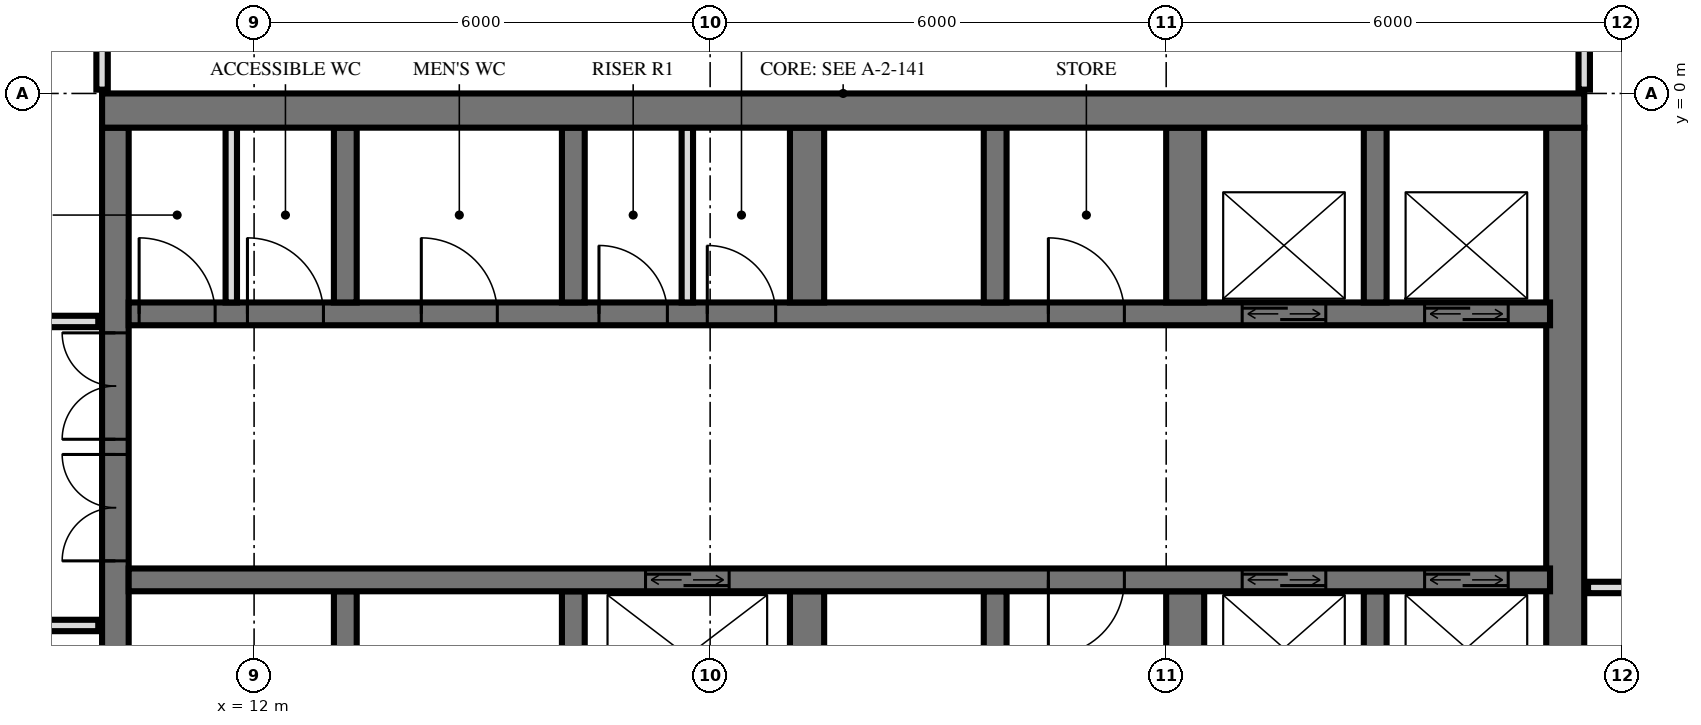
"""IFC4 building model, lengths in metres.
Left out: names, types, materials, properties, quantities, classifications, styles, units other than length and angle.
Written with IfcOpenShell. Run it as: python <this file> out.ifc"""

import sys

from ifc_helpers import new_model, si_unit, direction, frame, frame_2d, origin, place, context, subcontext, project, spatial, rectangle, extrude, element, fill, save


model = new_model("IFC4")
c1 = context("Model", 3, precision=1e-05, world=origin(), true_north=direction((0.0, 1.0)))
c2 = subcontext(c1, "Body", "Model", "MODEL_VIEW")
j1 = project(units=[si_unit("LENGTHUNIT", "METRE"), si_unit("PLANEANGLEUNIT", "RADIAN")], contexts=[c1])
p1 = place(None, origin())
s1 = spatial("IfcSite", under=j1, at=p1, CompositionType="ELEMENT")
p2 = place(p1, origin())
s2 = spatial("IfcBuilding", under=s1, at=p2, CompositionType="ELEMENT")
p3 = place(p2, frame((0.0, 0.0, 67.2)))
s3 = spatial("IfcBuildingStorey", under=s2, at=p3, CompositionType="ELEMENT", Elevation=67.2)
p4 = place(p3, frame((10.0, -0.225, 0.0), z_axis=(0.0, 0.0, 1.0), x_axis=(1.0, 0.0, 0.0)))
e1 = element("IfcWall", 1, at=p4, inside=s3, PredefinedType="SHEAR", context=c2, shape_type="SweptSolid", body=[
    extrude(rectangle(XDim=19.5, YDim=0.45, at=frame_2d((9.75, 0.0))), origin(), (0.0, 0.0, 1.0), 3.6),
])
p5 = place(p3, frame((10.175, -14.55, 0.0), z_axis=(0.0, 0.0, 1.0), x_axis=(0.0, 1.0, 0.0)))
e2 = element("IfcWall", 2, at=p5, inside=s3, PredefinedType="SHEAR", context=c2, shape_type="SweptSolid", body=[
    extrude(rectangle(XDim=14.1, YDim=0.35, at=frame_2d((7.05, 0.0))), origin(), (0.0, 0.0, 1.0), 3.6),
])
p6 = place(p5, frame((8.4, 0.0, 0.0)))
e3 = element("IfcOpeningElement", 3, at=p6, cuts=e2, PredefinedType="OPENING", context=c2, shape_type="SweptSolid", body=[
    extrude(rectangle(XDim=1.4, YDim=2.4, at=frame_2d((0.7, 1.2))), frame((0.0, 0.185, 0.0), z_axis=(0.0, -1.0, 0.0), x_axis=(1.0, 0.0, 0.0)), (0.0, 0.0, 1.0), 0.37),
])
p7 = place(p5, frame((10.0, 0.0, 0.0)))
e4 = element("IfcOpeningElement", 4, at=p7, cuts=e2, PredefinedType="OPENING", context=c2, shape_type="SweptSolid", body=[
    extrude(rectangle(XDim=1.4, YDim=2.4, at=frame_2d((0.7, 1.2))), frame((0.0, 0.185, 0.0), z_axis=(0.0, -1.0, 0.0), x_axis=(1.0, 0.0, 0.0)), (0.0, 0.0, 1.0), 0.37),
])
p8 = place(p5, frame((4.0, 0.0, 0.0)))
e5 = element("IfcOpeningElement", 5, at=p8, cuts=e2, PredefinedType="OPENING", context=c2, shape_type="SweptSolid", body=[
    extrude(rectangle(XDim=1.2, YDim=2.1, at=frame_2d((0.6, 1.05))), frame((0.0, 0.185, 0.0), z_axis=(0.0, -1.0, 0.0), x_axis=(1.0, 0.0, 0.0)), (0.0, 0.0, 1.0), 0.37),
])
p9 = place(p3, frame((29.25, -14.55, 0.0), z_axis=(0.0, 0.0, 1.0), x_axis=(0.0, 1.0, 0.0)))
e6 = element("IfcWall", 6, at=p9, inside=s3, PredefinedType="SHEAR", context=c2, shape_type="SweptSolid", body=[
    extrude(rectangle(XDim=14.1, YDim=0.5, at=frame_2d((7.05, 0.0))), origin(), (0.0, 0.0, 1.0), 3.6),
])
p10 = place(p3, frame((10.35, -2.9, 0.0), z_axis=(0.0, 0.0, 1.0), x_axis=(1.0, 0.0, 0.0)))
e7 = element("IfcWall", 7, at=p10, inside=s3, PredefinedType="SHEAR", context=c2, shape_type="SweptSolid", body=[
    extrude(rectangle(XDim=18.7, YDim=0.3, at=frame_2d((9.35, 0.0))), origin(), (0.0, 0.0, 1.0), 3.6),
])
p11 = place(p10, frame((14.65, 0.0, 0.0)))
e8 = element("IfcOpeningElement", 8, at=p11, cuts=e7, PredefinedType="OPENING", context=c2, shape_type="SweptSolid", body=[
    extrude(rectangle(XDim=1.1, YDim=2.1, at=frame_2d((0.55, 1.05))), frame((0.0, 0.16, 0.0), z_axis=(0.0, -1.0, 0.0), x_axis=(1.0, 0.0, 0.0)), (0.0, 0.0, 1.0), 0.32),
])
p12 = place(p10, frame((17.05, 0.0, 0.0)))
e9 = element("IfcOpeningElement", 9, at=p12, cuts=e7, PredefinedType="OPENING", context=c2, shape_type="SweptSolid", body=[
    extrude(rectangle(XDim=1.1, YDim=2.1, at=frame_2d((0.55, 1.05))), frame((0.0, 0.16, 0.0), z_axis=(0.0, -1.0, 0.0), x_axis=(1.0, 0.0, 0.0)), (0.0, 0.0, 1.0), 0.32),
])
p13 = place(p10, frame((6.188, 0.0, 0.0)))
e10 = element("IfcOpeningElement", 10, at=p13, cuts=e7, PredefinedType="OPENING", context=c2, shape_type="SweptSolid", body=[
    extrude(rectangle(XDim=0.9, YDim=2.1, at=frame_2d((0.45, 1.05))), frame((0.0, 0.16, 0.0), z_axis=(0.0, -1.0, 0.0), x_axis=(1.0, 0.0, 0.0)), (0.0, 0.0, 1.0), 0.32),
])
p14 = place(p10, frame((7.613, 0.0, 0.0)))
e11 = element("IfcOpeningElement", 11, at=p14, cuts=e7, PredefinedType="OPENING", context=c2, shape_type="SweptSolid", body=[
    extrude(rectangle(XDim=0.9, YDim=2.1, at=frame_2d((0.45, 1.05))), frame((0.0, 0.16, 0.0), z_axis=(0.0, -1.0, 0.0), x_axis=(1.0, 0.0, 0.0)), (0.0, 0.0, 1.0), 0.32),
])
p15 = place(p10, frame((0.137, 0.0, 0.0)))
e12 = element("IfcOpeningElement", 12, at=p15, cuts=e7, PredefinedType="OPENING", context=c2, shape_type="SweptSolid", body=[
    extrude(rectangle(XDim=1.0, YDim=2.1, at=frame_2d((0.5, 1.05))), frame((0.0, 0.16, 0.0), z_axis=(0.0, -1.0, 0.0), x_axis=(1.0, 0.0, 0.0)), (0.0, 0.0, 1.0), 0.32),
])
p16 = place(p10, frame((1.562, 0.0, 0.0)))
e13 = element("IfcOpeningElement", 13, at=p16, cuts=e7, PredefinedType="OPENING", context=c2, shape_type="SweptSolid", body=[
    extrude(rectangle(XDim=1.0, YDim=2.1, at=frame_2d((0.5, 1.05))), frame((0.0, 0.16, 0.0), z_axis=(0.0, -1.0, 0.0), x_axis=(1.0, 0.0, 0.0)), (0.0, 0.0, 1.0), 0.32),
])
p17 = place(p10, frame((3.85, 0.0, 0.0)))
e14 = element("IfcOpeningElement", 14, at=p17, cuts=e7, PredefinedType="OPENING", context=c2, shape_type="SweptSolid", body=[
    extrude(rectangle(XDim=1.0, YDim=2.1, at=frame_2d((0.5, 1.05))), frame((0.0, 0.16, 0.0), z_axis=(0.0, -1.0, 0.0), x_axis=(1.0, 0.0, 0.0)), (0.0, 0.0, 1.0), 0.32),
])
p18 = place(p10, frame((12.1, 0.0, 0.0)))
e15 = element("IfcOpeningElement", 15, at=p18, cuts=e7, PredefinedType="OPENING", context=c2, shape_type="SweptSolid", body=[
    extrude(rectangle(XDim=1.0, YDim=2.1, at=frame_2d((0.5, 1.05))), frame((0.0, 0.16, 0.0), z_axis=(0.0, -1.0, 0.0), x_axis=(1.0, 0.0, 0.0)), (0.0, 0.0, 1.0), 0.32),
])
p19 = place(p3, frame((10.35, -6.4, 0.0), z_axis=(0.0, 0.0, 1.0), x_axis=(1.0, 0.0, 0.0)))
e16 = element("IfcWall", 16, at=p19, inside=s3, PredefinedType="SHEAR", context=c2, shape_type="SweptSolid", body=[
    extrude(rectangle(XDim=18.7, YDim=0.3, at=frame_2d((9.35, 0.0))), origin(), (0.0, 0.0, 1.0), 3.6),
])
p20 = place(p19, frame((14.65, 0.0, 0.0)))
e17 = element("IfcOpeningElement", 17, at=p20, cuts=e16, PredefinedType="OPENING", context=c2, shape_type="SweptSolid", body=[
    extrude(rectangle(XDim=1.1, YDim=2.1, at=frame_2d((0.55, 1.05))), frame((0.0, 0.16, 0.0), z_axis=(0.0, -1.0, 0.0), x_axis=(1.0, 0.0, 0.0)), (0.0, 0.0, 1.0), 0.32),
])
p21 = place(p19, frame((17.05, 0.0, 0.0)))
e18 = element("IfcOpeningElement", 18, at=p21, cuts=e16, PredefinedType="OPENING", context=c2, shape_type="SweptSolid", body=[
    extrude(rectangle(XDim=1.1, YDim=2.1, at=frame_2d((0.55, 1.05))), frame((0.0, 0.16, 0.0), z_axis=(0.0, -1.0, 0.0), x_axis=(1.0, 0.0, 0.0)), (0.0, 0.0, 1.0), 0.32),
])
p22 = place(p19, frame((6.8, 0.0, 0.0)))
e19 = element("IfcOpeningElement", 19, at=p22, cuts=e16, PredefinedType="OPENING", context=c2, shape_type="SweptSolid", body=[
    extrude(rectangle(XDim=1.1, YDim=2.1, at=frame_2d((0.55, 1.05))), frame((0.0, 0.16, 0.0), z_axis=(0.0, -1.0, 0.0), x_axis=(1.0, 0.0, 0.0)), (0.0, 0.0, 1.0), 0.32),
])
p23 = place(p19, frame((12.1, 0.0, 0.0)))
e20 = element("IfcOpeningElement", 20, at=p23, cuts=e16, PredefinedType="OPENING", context=c2, shape_type="SweptSolid", body=[
    extrude(rectangle(XDim=1.0, YDim=2.1, at=frame_2d((0.5, 1.05))), frame((0.0, 0.16, 0.0), z_axis=(0.0, -1.0, 0.0), x_axis=(1.0, 0.0, 0.0)), (0.0, 0.0, 1.0), 0.32),
])
for number, where, z_axis, x_axis in (
    (21, (13.2, -2.75, 0.0), (0.0, 0.0, 1.0), (0.0, 1.0, 0.0)),
    (22, (13.2, -8.85, 0.0), (0.0, 0.0, 1.0), (0.0, 1.0, 0.0)),
    (23, (16.2, -2.75, 0.0), (0.0, 0.0, 1.0), (0.0, 1.0, 0.0)),
    (24, (16.2, -8.85, 0.0), (0.0, 0.0, 1.0), (0.0, 1.0, 0.0)),
):
    element("IfcWall", number, at=place(p3, frame(where, z_axis=z_axis, x_axis=x_axis)), inside=s3, PredefinedType="SHEAR", context=c2, shape_type="SweptSolid", body=[
        extrude(rectangle(XDim=2.3, YDim=0.3, at=frame_2d((1.15, 0.0))), origin(), (0.0, 0.0, 1.0), 3.6),
    ])
for number, where, z_axis, x_axis in (
    (25, (19.275, -2.75, 0.0), (0.0, 0.0, 1.0), (0.0, 1.0, 0.0)),
    (26, (19.275, -8.85, 0.0), (0.0, 0.0, 1.0), (0.0, 1.0, 0.0)),
):
    element("IfcWall", number, at=place(p3, frame(where, z_axis=z_axis, x_axis=x_axis)), inside=s3, PredefinedType="SHEAR", context=c2, shape_type="SweptSolid", body=[
        extrude(rectangle(XDim=2.3, YDim=0.45, at=frame_2d((1.15, 0.0))), origin(), (0.0, 0.0, 1.0), 3.6),
    ])
for number, where, z_axis, x_axis in (
    (27, (21.75, -2.75, 0.0), (0.0, 0.0, 1.0), (0.0, 1.0, 0.0)),
    (28, (21.75, -8.85, 0.0), (0.0, 0.0, 1.0), (0.0, 1.0, 0.0)),
):
    element("IfcWall", number, at=place(p3, frame(where, z_axis=z_axis, x_axis=x_axis)), inside=s3, PredefinedType="SHEAR", context=c2, shape_type="SweptSolid", body=[
        extrude(rectangle(XDim=2.3, YDim=0.3, at=frame_2d((1.15, 0.0))), origin(), (0.0, 0.0, 1.0), 3.6),
    ])
for number, where, z_axis, x_axis in (
    (29, (24.25, -2.75, 0.0), (0.0, 0.0, 1.0), (0.0, 1.0, 0.0)),
    (30, (24.25, -8.85, 0.0), (0.0, 0.0, 1.0), (0.0, 1.0, 0.0)),
):
    element("IfcWall", number, at=place(p3, frame(where, z_axis=z_axis, x_axis=x_axis)), inside=s3, PredefinedType="SHEAR", context=c2, shape_type="SweptSolid", body=[
        extrude(rectangle(XDim=2.3, YDim=0.5, at=frame_2d((1.15, 0.0))), origin(), (0.0, 0.0, 1.0), 3.6),
    ])
for number, where, z_axis, x_axis in (
    (31, (26.75, -2.75, 0.0), (0.0, 0.0, 1.0), (0.0, 1.0, 0.0)),
    (32, (26.75, -8.85, 0.0), (0.0, 0.0, 1.0), (0.0, 1.0, 0.0)),
):
    element("IfcWall", number, at=place(p3, frame(where, z_axis=z_axis, x_axis=x_axis)), inside=s3, PredefinedType="SHEAR", context=c2, shape_type="SweptSolid", body=[
        extrude(rectangle(XDim=2.3, YDim=0.3, at=frame_2d((1.15, 0.0))), origin(), (0.0, 0.0, 1.0), 3.6),
    ])
for number, where, z_axis, x_axis in (
    (33, (17.7, -2.75, 0.0), (0.0, 0.0, 1.0), (0.0, 1.0, 0.0)),
    (34, (11.7, -2.75, 0.0), (0.0, 0.0, 1.0), (0.0, 1.0, 0.0)),
):
    element("IfcWall", number, at=place(p3, frame(where, z_axis=z_axis, x_axis=x_axis)), inside=s3, PredefinedType="PARTITIONING", context=c2, shape_type="SweptSolid", body=[
        extrude(rectangle(XDim=2.3, YDim=0.15, at=frame_2d((1.15, 0.0))), origin(), (0.0, 0.0, 1.0), 3.3),
    ])
p24 = place(p3, frame((29.5, 0.05, 0.0), z_axis=(0.0, 0.0, 1.0), x_axis=(0.0, 1.0, 0.0)))
e35 = element("IfcWall", 35, at=p24, inside=s3, PredefinedType="PARTITIONING", context=c2, shape_type="SweptSolid", body=[
    extrude(rectangle(XDim=0.827, YDim=0.15, at=frame_2d((0.414, 0.0))), origin(), (0.0, 0.0, 1.0), 3.32),
])
p25 = place(p3, frame((10.0, 0.05, 0.0), z_axis=(0.0, 0.0, 1.0), x_axis=(0.0, 1.0, 0.0)))
e36 = element("IfcWall", 36, at=p25, inside=s3, PredefinedType="PARTITIONING", context=c2, shape_type="SweptSolid", body=[
    extrude(rectangle(XDim=0.97, YDim=0.15, at=frame_2d((0.485, 0.0))), origin(), (0.0, 0.0, 1.0), 3.32),
])
p26 = place(p3, frame((-9.95, -7.0, 0.0), z_axis=(0.0, 0.0, 1.0), x_axis=(1.0, 0.0, 0.0)))
e37 = element("IfcWall", 37, at=p26, inside=s3, PredefinedType="PARTITIONING", context=c2, shape_type="SweptSolid", body=[
    extrude(rectangle(XDim=19.9, YDim=0.15, at=frame_2d((9.95, 0.0))), origin(), (0.0, 0.0, 1.0), 3.32),
])
p27 = place(p26, frame((9.45, 0.0, 0.0)))
e38 = element("IfcOpeningElement", 38, at=p27, cuts=e37, PredefinedType="OPENING", context=c2, shape_type="SweptSolid", body=[
    extrude(rectangle(XDim=1.0, YDim=2.1, at=frame_2d((0.5, 1.05))), frame((0.0, 0.085, 0.0), z_axis=(0.0, -1.0, 0.0), x_axis=(1.0, 0.0, 0.0)), (0.0, 0.0, 1.0), 0.17),
])
p28 = place(p26, frame((3.45, 0.0, 0.0)))
e39 = element("IfcOpeningElement", 39, at=p28, cuts=e37, PredefinedType="OPENING", context=c2, shape_type="SweptSolid", body=[
    extrude(rectangle(XDim=1.0, YDim=2.1, at=frame_2d((0.5, 1.05))), frame((0.0, 0.085, 0.0), z_axis=(0.0, -1.0, 0.0), x_axis=(1.0, 0.0, 0.0)), (0.0, 0.0, 1.0), 0.17),
])
p29 = place(p3, frame((29.55, -6.5, 0.0), z_axis=(0.0, 0.0, 1.0), x_axis=(1.0, 0.0, 0.0)))
e40 = element("IfcWall", 40, at=p29, inside=s3, PredefinedType="PARTITIONING", context=c2, shape_type="SweptSolid", body=[
    extrude(rectangle(XDim=3.57, YDim=0.15, at=frame_2d((1.785, 0.0))), origin(), (0.0, 0.0, 1.0), 3.32),
])
p30 = place(p29, frame((1.4, 0.0, 0.0)))
e41 = element("IfcOpeningElement", 41, at=p30, cuts=e40, PredefinedType="OPENING", context=c2, shape_type="SweptSolid", body=[
    extrude(rectangle(XDim=0.9, YDim=2.1, at=frame_2d((0.45, 1.05))), frame((0.0, 0.085, 0.0), z_axis=(0.0, -1.0, 0.0), x_axis=(1.0, 0.0, 0.0)), (0.0, 0.0, 1.0), 0.17),
])
p31 = place(p3, frame((-9.95, -3.0, 0.0), z_axis=(0.0, 0.0, 1.0), x_axis=(1.0, 0.0, 0.0)))
e42 = element("IfcWall", 42, at=p31, inside=s3, PredefinedType="PARTITIONING", context=c2, shape_type="SweptSolid", body=[
    extrude(rectangle(XDim=19.9, YDim=0.15, at=frame_2d((9.95, 0.0))), origin(), (0.0, 0.0, 1.0), 3.32),
])
p32 = place(p31, frame((1.45, 0.0, 0.0)))
e43 = element("IfcOpeningElement", 43, at=p32, cuts=e42, PredefinedType="OPENING", context=c2, shape_type="SweptSolid", body=[
    extrude(rectangle(XDim=1.0, YDim=2.1, at=frame_2d((0.5, 1.05))), frame((0.0, 0.085, 0.0), z_axis=(0.0, -1.0, 0.0), x_axis=(1.0, 0.0, 0.0)), (0.0, 0.0, 1.0), 0.17),
])
p33 = place(p31, frame((4.95, 0.0, 0.0)))
e44 = element("IfcOpeningElement", 44, at=p33, cuts=e42, PredefinedType="OPENING", context=c2, shape_type="SweptSolid", body=[
    extrude(rectangle(XDim=1.0, YDim=2.1, at=frame_2d((0.5, 1.05))), frame((0.0, 0.085, 0.0), z_axis=(0.0, -1.0, 0.0), x_axis=(1.0, 0.0, 0.0)), (0.0, 0.0, 1.0), 0.17),
])
p34 = place(p31, frame((7.7, 0.0, 0.0)))
e45 = element("IfcOpeningElement", 45, at=p34, cuts=e42, PredefinedType="OPENING", context=c2, shape_type="SweptSolid", body=[
    extrude(rectangle(XDim=1.0, YDim=2.1, at=frame_2d((0.5, 1.05))), frame((0.0, 0.085, 0.0), z_axis=(0.0, -1.0, 0.0), x_axis=(1.0, 0.0, 0.0)), (0.0, 0.0, 1.0), 0.17),
])
p35 = place(p31, frame((14.2, 0.0, 0.0)))
e46 = element("IfcOpeningElement", 46, at=p35, cuts=e42, PredefinedType="OPENING", context=c2, shape_type="SweptSolid", body=[
    extrude(rectangle(XDim=1.0, YDim=2.1, at=frame_2d((0.5, 1.05))), frame((0.0, 0.085, 0.0), z_axis=(0.0, -1.0, 0.0), x_axis=(1.0, 0.0, 0.0)), (0.0, 0.0, 1.0), 0.17),
])
p36 = place(p11, origin())
e47 = element("IfcDoor", 47, at=p36, inside=s3, OperationType="DOUBLE_DOOR_SLIDING", PredefinedType="USERDEFINED", context=c2, shape_type="SweptSolid", body=[
    extrude(rectangle(XDim=1.1, YDim=2.1, at=frame_2d((0.55, 1.05))), frame((0.0, 0.025, 0.0), z_axis=(0.0, -1.0, 0.0), x_axis=(1.0, 0.0, 0.0)), (0.0, 0.0, 1.0), 0.05),
])
fill(e8, e47)
p37 = place(p12, origin())
e48 = element("IfcDoor", 48, at=p37, inside=s3, OperationType="DOUBLE_DOOR_SLIDING", PredefinedType="USERDEFINED", context=c2, shape_type="SweptSolid", body=[
    extrude(rectangle(XDim=1.1, YDim=2.1, at=frame_2d((0.55, 1.05))), frame((0.0, 0.025, 0.0), z_axis=(0.0, -1.0, 0.0), x_axis=(1.0, 0.0, 0.0)), (0.0, 0.0, 1.0), 0.05),
])
fill(e9, e48)
p38 = place(p20, origin())
e49 = element("IfcDoor", 49, at=p38, inside=s3, OperationType="DOUBLE_DOOR_SLIDING", PredefinedType="USERDEFINED", context=c2, shape_type="SweptSolid", body=[
    extrude(rectangle(XDim=1.1, YDim=2.1, at=frame_2d((0.55, 1.05))), frame((0.0, 0.025, 0.0), z_axis=(0.0, -1.0, 0.0), x_axis=(1.0, 0.0, 0.0)), (0.0, 0.0, 1.0), 0.05),
])
fill(e17, e49)
p39 = place(p21, origin())
e50 = element("IfcDoor", 50, at=p39, inside=s3, OperationType="DOUBLE_DOOR_SLIDING", PredefinedType="USERDEFINED", context=c2, shape_type="SweptSolid", body=[
    extrude(rectangle(XDim=1.1, YDim=2.1, at=frame_2d((0.55, 1.05))), frame((0.0, 0.025, 0.0), z_axis=(0.0, -1.0, 0.0), x_axis=(1.0, 0.0, 0.0)), (0.0, 0.0, 1.0), 0.05),
])
fill(e18, e50)
p40 = place(p22, origin())
e51 = element("IfcDoor", 51, at=p40, inside=s3, OperationType="DOUBLE_DOOR_SLIDING", PredefinedType="USERDEFINED", context=c2, shape_type="SweptSolid", body=[
    extrude(rectangle(XDim=1.1, YDim=2.1, at=frame_2d((0.55, 1.05))), frame((0.0, 0.025, 0.0), z_axis=(0.0, -1.0, 0.0), x_axis=(1.0, 0.0, 0.0)), (0.0, 0.0, 1.0), 0.05),
])
fill(e19, e51)
p41 = place(p6, origin())
e52 = element("IfcDoor", 52, at=p41, inside=s3, OperationType="DOUBLE_DOOR_SINGLE_SWING", PredefinedType="DOOR", context=c2, shape_type="SweptSolid", body=[
    extrude(rectangle(XDim=1.4, YDim=2.4, at=frame_2d((0.7, 1.2))), frame((0.0, 0.025, 0.0), z_axis=(0.0, -1.0, 0.0), x_axis=(1.0, 0.0, 0.0)), (0.0, 0.0, 1.0), 0.05),
])
fill(e3, e52)
p42 = place(p7, origin())
e53 = element("IfcDoor", 53, at=p42, inside=s3, OperationType="DOUBLE_DOOR_SINGLE_SWING", PredefinedType="DOOR", context=c2, shape_type="SweptSolid", body=[
    extrude(rectangle(XDim=1.4, YDim=2.4, at=frame_2d((0.7, 1.2))), frame((0.0, 0.025, 0.0), z_axis=(0.0, -1.0, 0.0), x_axis=(1.0, 0.0, 0.0)), (0.0, 0.0, 1.0), 0.05),
])
fill(e4, e53)
p43 = place(p13, origin())
e54 = element("IfcDoor", 54, at=p43, inside=s3, OperationType="SINGLE_SWING_RIGHT", PredefinedType="DOOR", context=c2, shape_type="SweptSolid", body=[
    extrude(rectangle(XDim=0.9, YDim=2.1, at=frame_2d((0.45, 1.05))), frame((0.0, 0.025, 0.0), z_axis=(0.0, -1.0, 0.0), x_axis=(1.0, 0.0, 0.0)), (0.0, 0.0, 1.0), 0.05),
])
fill(e10, e54)
p44 = place(p14, origin())
e55 = element("IfcDoor", 55, at=p44, inside=s3, OperationType="SINGLE_SWING_RIGHT", PredefinedType="DOOR", context=c2, shape_type="SweptSolid", body=[
    extrude(rectangle(XDim=0.9, YDim=2.1, at=frame_2d((0.45, 1.05))), frame((0.0, 0.025, 0.0), z_axis=(0.0, -1.0, 0.0), x_axis=(1.0, 0.0, 0.0)), (0.0, 0.0, 1.0), 0.05),
])
fill(e11, e55)
p45 = place(p15, origin())
e56 = element("IfcDoor", 56, at=p45, inside=s3, OperationType="SINGLE_SWING_RIGHT", PredefinedType="DOOR", context=c2, shape_type="SweptSolid", body=[
    extrude(rectangle(XDim=1.0, YDim=2.1, at=frame_2d((0.5, 1.05))), frame((0.0, 0.025, 0.0), z_axis=(0.0, -1.0, 0.0), x_axis=(1.0, 0.0, 0.0)), (0.0, 0.0, 1.0), 0.05),
])
fill(e12, e56)
p46 = place(p16, origin())
e57 = element("IfcDoor", 57, at=p46, inside=s3, OperationType="SINGLE_SWING_RIGHT", PredefinedType="DOOR", context=c2, shape_type="SweptSolid", body=[
    extrude(rectangle(XDim=1.0, YDim=2.1, at=frame_2d((0.5, 1.05))), frame((0.0, 0.025, 0.0), z_axis=(0.0, -1.0, 0.0), x_axis=(1.0, 0.0, 0.0)), (0.0, 0.0, 1.0), 0.05),
])
fill(e13, e57)
p47 = place(p17, origin())
e58 = element("IfcDoor", 58, at=p47, inside=s3, OperationType="SINGLE_SWING_RIGHT", PredefinedType="DOOR", context=c2, shape_type="SweptSolid", body=[
    extrude(rectangle(XDim=1.0, YDim=2.1, at=frame_2d((0.5, 1.05))), frame((0.0, 0.025, 0.0), z_axis=(0.0, -1.0, 0.0), x_axis=(1.0, 0.0, 0.0)), (0.0, 0.0, 1.0), 0.05),
])
fill(e14, e58)
p48 = place(p18, origin())
e59 = element("IfcDoor", 59, at=p48, inside=s3, OperationType="SINGLE_SWING_RIGHT", PredefinedType="DOOR", context=c2, shape_type="SweptSolid", body=[
    extrude(rectangle(XDim=1.0, YDim=2.1, at=frame_2d((0.5, 1.05))), frame((0.0, 0.025, 0.0), z_axis=(0.0, -1.0, 0.0), x_axis=(1.0, 0.0, 0.0)), (0.0, 0.0, 1.0), 0.05),
])
fill(e15, e59)
p49 = place(p23, frame((0.5, 0.0, 0.0), z_axis=(0.0, 0.0, 1.0), x_axis=(-1.0, 0.0, 0.0)))
e60 = element("IfcDoor", 60, at=p49, inside=s3, OperationType="SINGLE_SWING_LEFT", PredefinedType="DOOR", context=c2, shape_type="SweptSolid", body=[
    extrude(rectangle(XDim=1.0, YDim=2.1, at=frame_2d((0.0, 1.05))), frame((0.0, -0.025, 0.0), z_axis=(0.0, 1.0, 0.0), x_axis=(-1.0, 0.0, 0.0)), (0.0, 0.0, 1.0), 0.05),
])
fill(e20, e60)
save(model, sys.argv[1])
